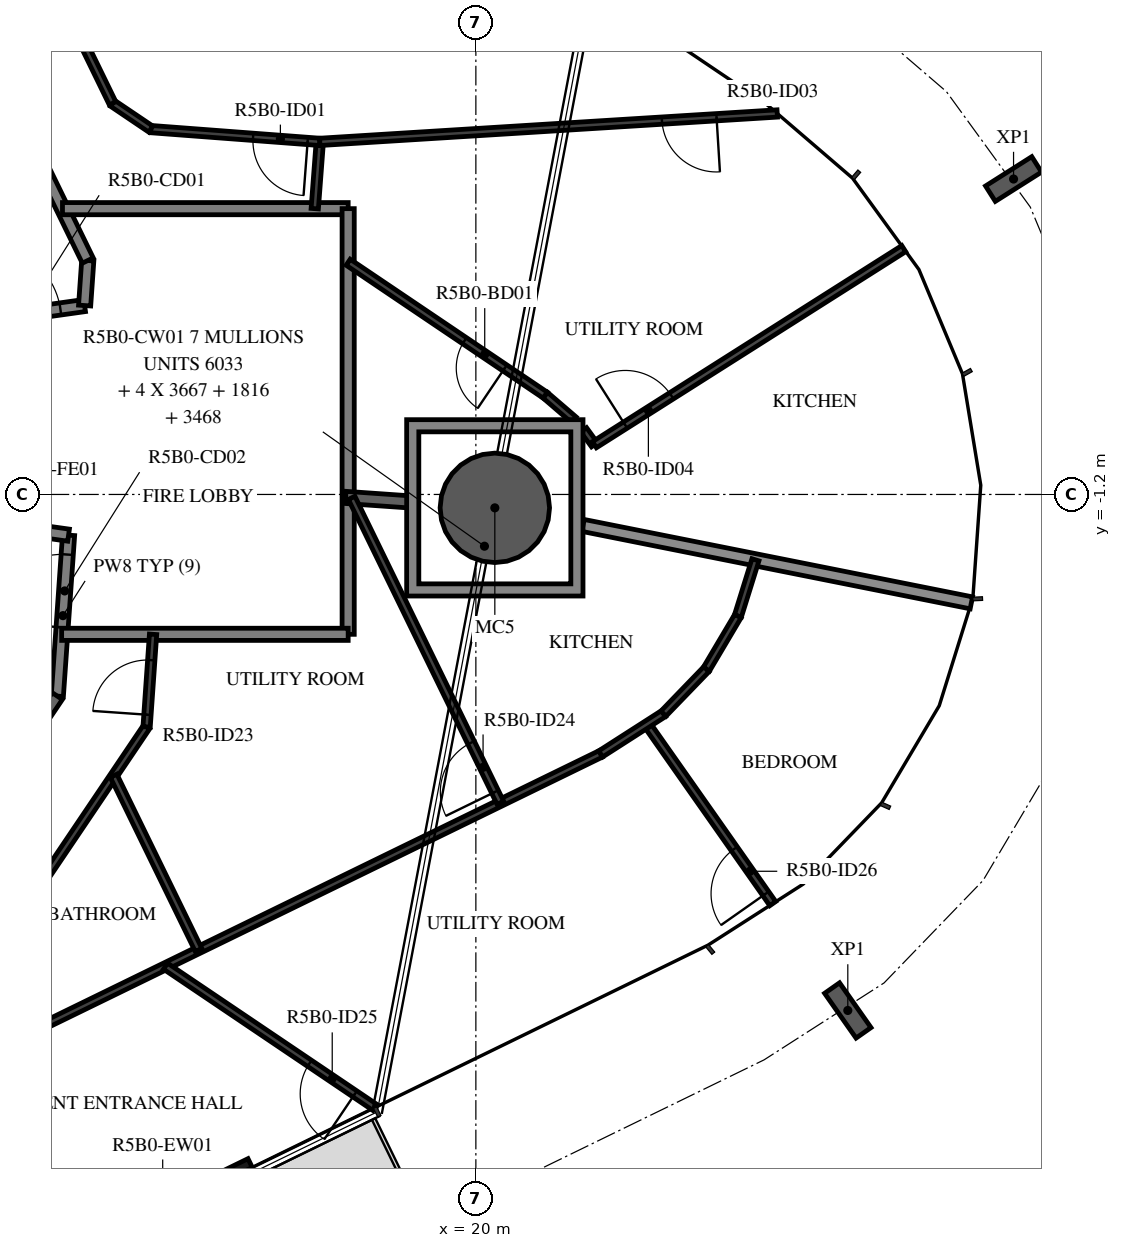
"""IFC4 building model, lengths in metres.
Left out: names, types, materials, properties, quantities, classifications, styles, units other than length and angle.
Written with IfcOpenShell. Run it as: python <this file> out.ifc"""

import sys

from ifc_helpers import new_model, si_unit, direction, frame, frame_2d, origin, origin_2d, place, context, subcontext, project, spatial, polyline, rectangle, hollow_circle, i_section, outline, extrude, element, fill, save


model = new_model("IFC4")
c1 = context("Model", 3, precision=1e-05, world=origin(), true_north=direction((0.0, 1.0)))
c2 = subcontext(c1, "Body", "Model", "MODEL_VIEW")
j1 = project(units=[si_unit("LENGTHUNIT", "METRE"), si_unit("PLANEANGLEUNIT", "RADIAN")], contexts=[c1])
p1 = place(None, origin())
s1 = spatial("IfcSite", under=j1, at=p1, CompositionType="ELEMENT")
p2 = place(p1, origin())
s2 = spatial("IfcBuilding", under=s1, at=p2, CompositionType="ELEMENT")
p3 = place(p2, frame((0.0, 0.0, 202.4)))
s3 = spatial("IfcBuildingStorey", under=s2, at=p3, CompositionType="ELEMENT", Elevation=202.4)
p4 = place(p3, frame((20.312, -1.42, -0.38), z_axis=(0.0, 0.0, 1.0), x_axis=(1.0, 0.0, 0.0)))
e1 = element("IfcColumn", 1, at=p4, inside=s3, PredefinedType="COLUMN", context=c2, shape_type="SweptSolid", body=[
    extrude(hollow_circle(Radius=0.9, WallThickness=0.04, at=origin_2d()), origin(), (0.0, 0.0, 1.0), 3.5),
])
for number, where, z_axis, x_axis in (
    (2, (26.117, -9.686, -0.38), (0.0, 0.0, 1.0), (-0.818, -0.575, 0.0)),
    (3, (28.842, 3.987, -0.38), (0.0, 0.0, 1.0), (0.535, -0.845, 0.0)),
):
    element("IfcColumn", number, at=place(p3, frame(where, z_axis=z_axis, x_axis=x_axis)), inside=s3, PredefinedType="COLUMN", context=c2, shape_type="SweptSolid", body=[
        extrude(i_section(OverallWidth=0.3, OverallDepth=0.9, WebThickness=0.019, FlangeThickness=0.035, FilletRadius=0.03, at=origin_2d()), origin(), (0.0, 0.0, 1.0), 3.5),
    ])
p5 = place(p3, frame((13.412, -13.598, 0.0), z_axis=(0.0, 0.0, 1.0), x_axis=(0.898793373747, 0.438372525723, 0.0)))
e4 = element("IfcWall", 4, at=p5, inside=s3, PredefinedType="STANDARD", context=c2, shape_type="SweptSolid", body=[
    extrude(rectangle(XDim=3.2, YDim=0.16, at=frame_2d((1.6, 0.0))), origin(), (0.0, 0.0, 1.0), 3.12),
])
p6 = place(p5, frame((0.4, 0.0, 0.0)))
e5 = element("IfcOpeningElement", 5, at=p6, cuts=e4, PredefinedType="OPENING", context=c2, shape_type="SweptSolid", body=[
    extrude(rectangle(XDim=2.4, YDim=2.4, at=frame_2d((1.2, 1.2))), frame((0.0, 0.09, 0.0), z_axis=(0.0, -1.0, 0.0), x_axis=(1.0, 0.0, 0.0)), (0.0, 0.0, 1.0), 0.18),
])
p7 = place(p3, frame((11.87, 1.668, 0.0), z_axis=(0.0, 0.0, 1.0), x_axis=(0.990271931984, 0.139145609792, 0.0)))
e6 = element("IfcWall", 6, at=p7, inside=s3, PredefinedType="STANDARD", context=c2, shape_type="SweptSolid", body=[
    extrude(rectangle(XDim=1.712, YDim=0.2, at=frame_2d((0.856, 0.0))), origin(), (0.0, 0.0, 1.0), 3.12),
])
p8 = place(p7, frame((0.11, 0.0, 0.0)))
e7 = element("IfcOpeningElement", 7, at=p8, cuts=e6, PredefinedType="OPENING", context=c2, shape_type="SweptSolid", body=[
    extrude(rectangle(XDim=1.2, YDim=2.1, at=frame_2d((0.6, 1.05))), frame((0.0, 0.11, 0.0), z_axis=(0.0, -1.0, 0.0), x_axis=(1.0, 0.0, 0.0)), (0.0, 0.0, 1.0), 0.22),
])
p9 = place(p3, frame((13.566, 1.906, 0.0), z_axis=(0.0, 0.0, 1.0), x_axis=(0.07005495793, 0.997543133338, 0.0)))
e8 = element("IfcWall", 8, at=p9, inside=s3, PredefinedType="STANDARD", context=c2, shape_type="SweptSolid", body=[
    extrude(rectangle(XDim=0.742, YDim=0.2, at=frame_2d((0.371, 0.0))), origin(), (0.0, 0.0, 1.0), 3.12),
])
p10 = place(p3, frame((13.618, 2.647, 0.0), z_axis=(0.0, 0.0, 1.0), x_axis=(-0.438366026218, 0.898796543751, 0.0)))
e9 = element("IfcWall", 9, at=p10, inside=s3, PredefinedType="STANDARD", context=c2, shape_type="SweptSolid", body=[
    extrude(rectangle(XDim=7.181, YDim=0.2, at=frame_2d((3.591, 0.0))), origin(), (0.0, 0.0, 1.0), 3.12),
])
p11 = place(p3, frame((13.117, -4.517, 0.0), z_axis=(0.0, 0.0, 1.0), x_axis=(0.069736659613, 0.997565435601, 0.0)))
e10 = element("IfcWall", 10, at=p11, inside=s3, PredefinedType="STANDARD", context=c2, shape_type="SweptSolid", body=[
    extrude(rectangle(XDim=2.654, YDim=0.2, at=frame_2d((1.327, 0.0))), origin(), (0.0, 0.0, 1.0), 3.12),
])
p12 = place(p11, frame((1.134, 0.0, 0.0)))
e11 = element("IfcOpeningElement", 11, at=p12, cuts=e10, PredefinedType="OPENING", context=c2, shape_type="SweptSolid", body=[
    extrude(rectangle(XDim=1.2, YDim=2.1, at=frame_2d((0.6, 1.05))), frame((0.0, 0.11, 0.0), z_axis=(0.0, -1.0, 0.0), x_axis=(1.0, 0.0, 0.0)), (0.0, 0.0, 1.0), 0.22),
])
p13 = place(p3, frame((13.302, -1.869, 0.0), z_axis=(0.0, 0.0, 1.0), x_axis=(-0.990274397042, 0.13912806533, 0.0)))
e12 = element("IfcWall", 12, at=p13, inside=s3, PredefinedType="STANDARD", context=c2, shape_type="SweptSolid", body=[
    extrude(rectangle(XDim=1.446, YDim=0.2, at=frame_2d((0.723, 0.0))), origin(), (0.0, 0.0, 1.0), 3.12),
])
p14 = place(p3, frame((9.101, -10.47, 0.0), z_axis=(0.0, 0.0, 1.0), x_axis=(0.559195469534, 0.829035841718, 0.0)))
e13 = element("IfcWall", 13, at=p14, inside=s3, PredefinedType="STANDARD", context=c2, shape_type="SweptSolid", body=[
    extrude(rectangle(XDim=7.181, YDim=0.2, at=frame_2d((3.591, 0.0))), origin(), (0.0, 0.0, 1.0), 3.12),
])
p15 = place(p3, frame((17.9, 3.5, 0.0), z_axis=(0.0, 0.0, 1.0), x_axis=(-1.0, 0.0, 0.0)))
e14 = element("IfcWall", 14, at=p15, inside=s3, PredefinedType="STANDARD", context=c2, shape_type="SweptSolid", body=[
    extrude(rectangle(XDim=4.698, YDim=0.2, at=frame_2d((2.349, 0.0))), origin(), (0.0, 0.0, 1.0), 3.12),
])
p16 = place(p3, frame((17.9, -3.5, 0.0), z_axis=(0.0, 0.0, 1.0), x_axis=(0.0, 1.0, 0.0)))
e15 = element("IfcWall", 15, at=p16, inside=s3, PredefinedType="STANDARD", context=c2, shape_type="SweptSolid", body=[
    extrude(rectangle(XDim=7.0, YDim=0.2, at=frame_2d((3.5, 0.0))), origin(), (0.0, 0.0, 1.0), 3.12),
])
p17 = place(p3, frame((13.188, -3.5, 0.0), z_axis=(0.0, 0.0, 1.0), x_axis=(1.0, 0.0, 0.0)))
e16 = element("IfcWall", 16, at=p17, inside=s3, PredefinedType="STANDARD", context=c2, shape_type="SweptSolid", body=[
    extrude(rectangle(XDim=4.712, YDim=0.2, at=frame_2d((2.356, 0.0))), origin(), (0.0, 0.0, 1.0), 3.12),
])
p18 = place(p3, frame((17.857, -1.249, 0.0), z_axis=(0.0, 0.0, 1.0), x_axis=(0.997556932604, -0.069858186453, 0.0)))
e17 = element("IfcWall", 17, at=p18, inside=s3, PredefinedType="STANDARD", context=c2, shape_type="SweptSolid", body=[
    extrude(rectangle(XDim=1.087, YDim=0.2, at=frame_2d((0.543, 0.0))), origin(), (0.0, 0.0, 1.0), 3.12),
])
p19 = place(p3, frame((21.762, -1.709, 0.0), z_axis=(0.0, 0.0, 1.0), x_axis=(0.980707365343, -0.195481619501, 0.0)))
e18 = element("IfcWall", 18, at=p19, inside=s3, PredefinedType="STANDARD", context=c2, shape_type="SweptSolid", body=[
    extrude(rectangle(XDim=6.512, YDim=0.2, at=frame_2d((3.256, 0.0))), origin(), (0.0, 0.0, 1.0), 2.73),
])
p20 = place(p3, frame((17.351, 3.5, 0.0), z_axis=(0.0, 0.0, 1.0), x_axis=(0.075374124137, 0.997155324616, 0.0)))
e19 = element("IfcWall", 19, at=p20, inside=s3, PredefinedType="PARTITIONING", context=c2, shape_type="SweptSolid", body=[
    extrude(rectangle(XDim=1.101, YDim=0.12, at=frame_2d((0.551, 0.0))), origin(), (0.0, 0.0, 1.0), 3.12),
])
p21 = place(p3, frame((17.434, 4.598, 0.0), z_axis=(0.0, 0.0, 1.0), x_axis=(-0.997152077354, 0.075417071205, 0.0)))
e20 = element("IfcWall", 20, at=p21, inside=s3, PredefinedType="PARTITIONING", context=c2, shape_type="SweptSolid", body=[
    extrude(rectangle(XDim=2.787, YDim=0.12, at=frame_2d((1.394, 0.0))), origin(), (0.0, 0.0, 1.0), 3.12),
])
p22 = place(p21, frame((0.2, 0.0, 0.0)))
e21 = element("IfcOpeningElement", 21, at=p22, cuts=e20, PredefinedType="OPENING", context=c2, shape_type="SweptSolid", body=[
    extrude(rectangle(XDim=0.9, YDim=2.1, at=frame_2d((0.45, 1.05))), frame((0.0, 0.07, 0.0), z_axis=(0.0, -1.0, 0.0), x_axis=(1.0, 0.0, 0.0)), (0.0, 0.0, 1.0), 0.14),
])
p23 = place(p3, frame((14.654, 4.808, 0.0), z_axis=(0.0, 0.0, 1.0), x_axis=(-0.829065184024, 0.559151965604, 0.0)))
e22 = element("IfcWall", 22, at=p23, inside=s3, PredefinedType="PARTITIONING", context=c2, shape_type="SweptSolid", body=[
    extrude(rectangle(XDim=0.758, YDim=0.12, at=frame_2d((0.379, 0.0))), origin(), (0.0, 0.0, 1.0), 3.12),
])
p24 = place(p3, frame((14.026, 5.232, 0.0), z_axis=(0.0, 0.0, 1.0), x_axis=(-0.438374985284, 0.89879217413, 0.0)))
e23 = element("IfcWall", 23, at=p24, inside=s3, PredefinedType="PARTITIONING", context=c2, shape_type="SweptSolid", body=[
    extrude(rectangle(XDim=5.438, YDim=0.12, at=frame_2d((2.719, 0.0))), origin(), (0.0, 0.0, 1.0), 3.12),
])
p25 = place(p3, frame((21.61, 0.03, 0.0), z_axis=(0.0, 0.0, 1.0), x_axis=(-0.758532196215, 0.651635563259, 0.0)))
e24 = element("IfcWall", 24, at=p25, inside=s3, PredefinedType="PARTITIONING", context=c2, shape_type="SweptSolid", body=[
    extrude(rectangle(XDim=0.619, YDim=0.12, at=frame_2d((0.31, 0.0))), origin(), (0.0, 0.0, 1.0), 3.12),
])
p26 = place(p3, frame((21.141, 0.433, 0.0), z_axis=(0.0, 0.0, 1.0), x_axis=(-0.829049908454, 0.559174614313, 0.0)))
e25 = element("IfcWall", 25, at=p26, inside=s3, PredefinedType="PARTITIONING", context=c2, shape_type="SweptSolid", body=[
    extrude(rectangle(XDim=3.909, YDim=0.12, at=frame_2d((1.955, 0.0))), origin(), (0.0, 0.0, 1.0), 3.12),
])
p27 = place(p26, frame((0.8, 0.0, 0.0)))
e26 = element("IfcOpeningElement", 26, at=p27, cuts=e25, PredefinedType="OPENING", context=c2, shape_type="SweptSolid", body=[
    extrude(rectangle(XDim=0.8, YDim=2.1, at=frame_2d((0.4, 1.05))), frame((0.0, 0.07, 0.0), z_axis=(0.0, -1.0, 0.0), x_axis=(1.0, 0.0, 0.0)), (0.0, 0.0, 1.0), 0.14),
])
p28 = place(p3, frame((24.956, 5.065, 0.0), z_axis=(0.0, 0.0, 1.0), x_axis=(-0.998076202118, -0.061999151332, 0.0)))
e27 = element("IfcWall", 27, at=p28, inside=s3, PredefinedType="PARTITIONING", context=c2, shape_type="SweptSolid", body=[
    extrude(rectangle(XDim=7.537, YDim=0.12, at=frame_2d((3.769, 0.0))), origin(), (0.0, 0.0, 1.0), 3.12),
])
p29 = place(p28, frame((1.0, 0.0, 0.0)))
e28 = element("IfcOpeningElement", 28, at=p29, cuts=e27, PredefinedType="OPENING", context=c2, shape_type="SweptSolid", body=[
    extrude(rectangle(XDim=0.9, YDim=2.1, at=frame_2d((0.45, 1.05))), frame((0.0, 0.07, 0.0), z_axis=(0.0, -1.0, 0.0), x_axis=(1.0, 0.0, 0.0)), (0.0, 0.0, 1.0), 0.14),
])
p30 = place(p3, frame((21.772, -0.136, 0.0), z_axis=(0.0, 0.0, 1.0), x_axis=(0.587310294779, -0.809361858285, 0.0)))
e29 = element("IfcWall", 29, at=p30, inside=s3, PredefinedType="PARTITIONING", context=c2, shape_type="SweptSolid", body=[
    extrude(rectangle(XDim=0.303, YDim=0.12, at=frame_2d((0.152, 0.0))), origin(), (0.0, 0.0, 1.0), 3.12),
])
p31 = place(p3, frame((21.95, -0.382, 0.0), z_axis=(0.0, 0.0, 1.0), x_axis=(0.844596663126, 0.535403097336, 0.0)))
e30 = element("IfcWall", 30, at=p31, inside=s3, PredefinedType="PARTITIONING", context=c2, shape_type="SweptSolid", body=[
    extrude(rectangle(XDim=6.022, YDim=0.12, at=frame_2d((3.011, 0.0))), origin(), (0.0, 0.0, 1.0), 2.73),
])
p32 = place(p31, frame((0.6, 0.0, 0.0)))
e31 = element("IfcOpeningElement", 31, at=p32, cuts=e30, PredefinedType="OPENING", context=c2, shape_type="SweptSolid", body=[
    extrude(rectangle(XDim=0.9, YDim=2.1, at=frame_2d((0.45, 1.05))), frame((0.0, 0.07, 0.0), z_axis=(0.0, -1.0, 0.0), x_axis=(1.0, 0.0, 0.0)), (0.0, 0.0, 1.0), 0.14),
])
p33 = place(p3, frame((10.12, -11.642, 0.0), z_axis=(0.0, 0.0, 1.0), x_axis=(0.55920080659, 0.829032241779, 0.0)))
e32 = element("IfcWall", 32, at=p33, inside=s3, PredefinedType="PARTITIONING", context=c2, shape_type="SweptSolid", body=[
    extrude(rectangle(XDim=7.985, YDim=0.12, at=frame_2d((3.992, 0.0))), origin(), (0.0, 0.0, 1.0), 3.12),
])
p34 = place(p33, frame((2.138, 0.0, 0.0)))
e33 = element("IfcOpeningElement", 33, at=p34, cuts=e32, PredefinedType="OPENING", context=c2, shape_type="SweptSolid", body=[
    extrude(rectangle(XDim=0.8, YDim=2.1, at=frame_2d((0.4, 1.05))), frame((0.0, 0.07, 0.0), z_axis=(0.0, -1.0, 0.0), x_axis=(1.0, 0.0, 0.0)), (0.0, 0.0, 1.0), 0.14),
])
p35 = place(p3, frame((14.585, -5.022, 0.0), z_axis=(0.0, 0.0, 1.0), x_axis=(0.069757481187, 0.997563979812, 0.0)))
e34 = element("IfcWall", 34, at=p35, inside=s3, PredefinedType="PARTITIONING", context=c2, shape_type="SweptSolid", body=[
    extrude(rectangle(XDim=1.526, YDim=0.12, at=frame_2d((0.763, 0.0))), origin(), (0.0, 0.0, 1.0), 3.12),
])
p36 = place(p35, frame((0.2, 0.0, 0.0)))
e35 = element("IfcOpeningElement", 35, at=p36, cuts=e34, PredefinedType="OPENING", context=c2, shape_type="SweptSolid", body=[
    extrude(rectangle(XDim=0.9, YDim=2.1, at=frame_2d((0.45, 1.05))), frame((0.0, 0.07, 0.0), z_axis=(0.0, -1.0, 0.0), x_axis=(1.0, 0.0, 0.0)), (0.0, 0.0, 1.0), 0.14),
])
p37 = place(p3, frame((22.052, -5.467, 0.0), z_axis=(0.0, 0.0, 1.0), x_axis=(-0.898796865831, -0.438365365846, 0.0)))
e36 = element("IfcWall", 36, at=p37, inside=s3, PredefinedType="PARTITIONING", context=c2, shape_type="SweptSolid", body=[
    extrude(rectangle(XDim=12.879, YDim=0.12, at=frame_2d((6.439, 0.0))), origin(), (0.0, 0.0, 1.0), 3.12),
])
p38 = place(p3, frame((18.343, -11.282, 0.0), z_axis=(0.0, 0.0, 1.0), x_axis=(-0.829047434778, 0.559178281845, 0.0)))
e37 = element("IfcWall", 37, at=p38, inside=s3, PredefinedType="PARTITIONING", context=c2, shape_type="SweptSolid", body=[
    extrude(rectangle(XDim=4.157, YDim=0.12, at=frame_2d((2.079, 0.0))), origin(), (0.0, 0.0, 1.0), 3.12),
])
p39 = place(p38, frame((0.4, 0.0, 0.0)))
e38 = element("IfcOpeningElement", 38, at=p39, cuts=e37, PredefinedType="OPENING", context=c2, shape_type="SweptSolid", body=[
    extrude(rectangle(XDim=0.9, YDim=2.1, at=frame_2d((0.45, 1.05))), frame((0.0, 0.07, 0.0), z_axis=(0.0, -1.0, 0.0), x_axis=(1.0, 0.0, 0.0)), (0.0, 0.0, 1.0), 0.14),
])
p40 = place(p3, frame((15.44, -8.692, 0.0), z_axis=(0.0, 0.0, 1.0), x_axis=(-0.438339139088, 0.898809656792, 0.0)))
e39 = element("IfcWall", 39, at=p40, inside=s3, PredefinedType="PARTITIONING", context=c2, shape_type="SweptSolid", body=[
    extrude(rectangle(XDim=3.188, YDim=0.12, at=frame_2d((1.594, 0.0))), origin(), (0.0, 0.0, 1.0), 3.12),
])
p41 = place(p3, frame((24.883, -7.929, 0.0), z_axis=(0.0, 0.0, 1.0), x_axis=(-0.574753041075, 0.818326916198, 0.0)))
e40 = element("IfcWall", 40, at=p41, inside=s3, PredefinedType="PARTITIONING", context=c2, shape_type="SweptSolid", body=[
    extrude(rectangle(XDim=3.603, YDim=0.12, at=frame_2d((1.802, 0.0))), origin(), (0.0, 0.0, 1.0), 3.12),
])
p42 = place(p41, frame((0.2, 0.0, 0.0)))
e41 = element("IfcOpeningElement", 41, at=p42, cuts=e40, PredefinedType="OPENING", context=c2, shape_type="SweptSolid", body=[
    extrude(rectangle(XDim=0.9, YDim=2.1, at=frame_2d((0.45, 1.05))), frame((0.0, 0.07, 0.0), z_axis=(0.0, -1.0, 0.0), x_axis=(1.0, 0.0, 0.0)), (0.0, 0.0, 1.0), 0.14),
])
p43 = place(p3, frame((23.085, -4.805, 0.0), z_axis=(0.0, 0.0, 1.0), x_axis=(-0.841804960937, -0.539781814942, 0.0)))
e42 = element("IfcWall", 42, at=p43, inside=s3, PredefinedType="PARTITIONING", context=c2, shape_type="SweptSolid", body=[
    extrude(rectangle(XDim=1.227, YDim=0.12, at=frame_2d((0.614, 0.0))), origin(), (0.0, 0.0, 1.0), 3.12),
])
p44 = place(p3, frame((20.403, -6.271, 0.0), z_axis=(0.0, 0.0, 1.0), x_axis=(-0.438371913736, 0.898793672234, 0.0)))
e43 = element("IfcWall", 43, at=p44, inside=s3, PredefinedType="PARTITIONING", context=c2, shape_type="SweptSolid", body=[
    extrude(rectangle(XDim=5.58, YDim=0.12, at=frame_2d((2.79, 0.0))), origin(), (0.0, 0.0, 1.0), 3.12),
])
p45 = place(p44, frame((0.2, 0.0, 0.0)))
e44 = element("IfcOpeningElement", 44, at=p45, cuts=e43, PredefinedType="OPENING", context=c2, shape_type="SweptSolid", body=[
    extrude(rectangle(XDim=0.9, YDim=2.1, at=frame_2d((0.45, 1.05))), frame((0.0, 0.07, 0.0), z_axis=(0.0, -1.0, 0.0), x_axis=(1.0, 0.0, 0.0)), (0.0, 0.0, 1.0), 0.14),
])
p46 = place(p3, frame((24.598, -2.275, 0.0), z_axis=(0.0, 0.0, 1.0), x_axis=(-0.297959469991, -0.95457852178, 0.0)))
e45 = element("IfcWall", 45, at=p46, inside=s3, PredefinedType="PARTITIONING", context=c2, shape_type="SweptSolid", body=[
    extrude(rectangle(XDim=0.969, YDim=0.12, at=frame_2d((0.485, 0.0))), origin(), (0.0, 0.0, 1.0), 3.12),
])
p47 = place(p3, frame((24.309, -3.2, 0.0), z_axis=(0.0, 0.0, 1.0), x_axis=(-0.509894600044, -0.860236884146, 0.0)))
e46 = element("IfcWall", 46, at=p47, inside=s3, PredefinedType="PARTITIONING", context=c2, shape_type="SweptSolid", body=[
    extrude(rectangle(XDim=1.016, YDim=0.12, at=frame_2d((0.508, 0.0))), origin(), (0.0, 0.0, 1.0), 3.12),
])
p48 = place(p3, frame((23.791, -4.074, 0.0), z_axis=(0.0, 0.0, 1.0), x_axis=(-0.694744601716, -0.719256517792, 0.0)))
e47 = element("IfcWall", 47, at=p48, inside=s3, PredefinedType="PARTITIONING", context=c2, shape_type="SweptSolid", body=[
    extrude(rectangle(XDim=1.016, YDim=0.12, at=frame_2d((0.508, 0.0))), origin(), (0.0, 0.0, 1.0), 3.12),
])
p49 = place(p3, origin())
e48 = element("IfcWall", 48, at=p49, inside=s3, PredefinedType="STANDARD", context=c2, shape_type="SweptSolid", body=[
    extrude(outline(polyline([(21.762, 0.03), (21.762, -2.87), (18.862, -2.87), (18.862, 0.03), (21.762, 0.03)]), holes=[polyline([(19.062, -2.67), (21.562, -2.67), (21.562, -0.17), (19.062, -0.17), (19.062, -2.67)])]), origin(), (0.0, 0.0, 1.0), 3.12),
])
p50 = place(p22, origin())
e49 = element("IfcDoor", 49, at=p50, inside=s3, OperationType="SINGLE_SWING_LEFT", PredefinedType="DOOR", context=c2, shape_type="SweptSolid", body=[
    extrude(rectangle(XDim=0.9, YDim=2.1, at=frame_2d((0.45, 1.05))), frame((0.0, 0.025, 0.0), z_axis=(0.0, -1.0, 0.0), x_axis=(1.0, 0.0, 0.0)), (0.0, 0.0, 1.0), 0.05),
])
fill(e21, e49)
p51 = place(p29, origin())
e50 = element("IfcDoor", 50, at=p51, inside=s3, OperationType="SINGLE_SWING_LEFT", PredefinedType="DOOR", context=c2, shape_type="SweptSolid", body=[
    extrude(rectangle(XDim=0.9, YDim=2.1, at=frame_2d((0.45, 1.05))), frame((0.0, 0.025, 0.0), z_axis=(0.0, -1.0, 0.0), x_axis=(1.0, 0.0, 0.0)), (0.0, 0.0, 1.0), 0.05),
])
fill(e28, e50)
p52 = place(p27, origin())
e51 = element("IfcDoor", 51, at=p52, inside=s3, OperationType="SINGLE_SWING_RIGHT", PredefinedType="DOOR", context=c2, shape_type="SweptSolid", body=[
    extrude(rectangle(XDim=0.8, YDim=2.1, at=frame_2d((0.4, 1.05))), frame((0.0, 0.025, 0.0), z_axis=(0.0, -1.0, 0.0), x_axis=(1.0, 0.0, 0.0)), (0.0, 0.0, 1.0), 0.05),
])
fill(e26, e51)
p53 = place(p32, origin())
e52 = element("IfcDoor", 52, at=p53, inside=s3, OperationType="SINGLE_SWING_LEFT", PredefinedType="DOOR", context=c2, shape_type="SweptSolid", body=[
    extrude(rectangle(XDim=0.9, YDim=2.1, at=frame_2d((0.45, 1.05))), frame((0.0, 0.025, 0.0), z_axis=(0.0, -1.0, 0.0), x_axis=(1.0, 0.0, 0.0)), (0.0, 0.0, 1.0), 0.05),
])
fill(e31, e52)
p54 = place(p36, origin())
e53 = element("IfcDoor", 53, at=p54, inside=s3, OperationType="SINGLE_SWING_RIGHT", PredefinedType="DOOR", context=c2, shape_type="SweptSolid", body=[
    extrude(rectangle(XDim=0.9, YDim=2.1, at=frame_2d((0.45, 1.05))), frame((0.0, 0.025, 0.0), z_axis=(0.0, -1.0, 0.0), x_axis=(1.0, 0.0, 0.0)), (0.0, 0.0, 1.0), 0.05),
])
fill(e35, e53)
p55 = place(p45, origin())
e54 = element("IfcDoor", 54, at=p55, inside=s3, OperationType="SINGLE_SWING_RIGHT", PredefinedType="DOOR", context=c2, shape_type="SweptSolid", body=[
    extrude(rectangle(XDim=0.9, YDim=2.1, at=frame_2d((0.45, 1.05))), frame((0.0, 0.025, 0.0), z_axis=(0.0, -1.0, 0.0), x_axis=(1.0, 0.0, 0.0)), (0.0, 0.0, 1.0), 0.05),
])
fill(e44, e54)
p56 = place(p39, origin())
e55 = element("IfcDoor", 55, at=p56, inside=s3, OperationType="SINGLE_SWING_RIGHT", PredefinedType="DOOR", context=c2, shape_type="SweptSolid", body=[
    extrude(rectangle(XDim=0.9, YDim=2.1, at=frame_2d((0.45, 1.05))), frame((0.0, 0.025, 0.0), z_axis=(0.0, -1.0, 0.0), x_axis=(1.0, 0.0, 0.0)), (0.0, 0.0, 1.0), 0.05),
])
fill(e38, e55)
p57 = place(p42, origin())
e56 = element("IfcDoor", 56, at=p57, inside=s3, OperationType="SINGLE_SWING_RIGHT", PredefinedType="DOOR", context=c2, shape_type="SweptSolid", body=[
    extrude(rectangle(XDim=0.9, YDim=2.1, at=frame_2d((0.45, 1.05))), frame((0.0, 0.025, 0.0), z_axis=(0.0, -1.0, 0.0), x_axis=(1.0, 0.0, 0.0)), (0.0, 0.0, 1.0), 0.05),
])
fill(e41, e56)
p58 = place(p8, origin())
e57 = element("IfcDoor", 57, at=p58, inside=s3, OperationType="DOUBLE_DOOR_SINGLE_SWING", PredefinedType="DOOR", context=c2, shape_type="SweptSolid", body=[
    extrude(rectangle(XDim=1.2, YDim=2.1, at=frame_2d((0.6, 1.05))), frame((0.0, 0.025, 0.0), z_axis=(0.0, -1.0, 0.0), x_axis=(1.0, 0.0, 0.0)), (0.0, 0.0, 1.0), 0.05),
])
fill(e7, e57)
p59 = place(p12, origin())
e58 = element("IfcDoor", 58, at=p59, inside=s3, OperationType="DOUBLE_DOOR_SINGLE_SWING", PredefinedType="DOOR", context=c2, shape_type="SweptSolid", body=[
    extrude(rectangle(XDim=1.2, YDim=2.1, at=frame_2d((0.6, 1.05))), frame((0.0, 0.025, 0.0), z_axis=(0.0, -1.0, 0.0), x_axis=(1.0, 0.0, 0.0)), (0.0, 0.0, 1.0), 0.05),
])
fill(e11, e58)
save(model, sys.argv[1])
